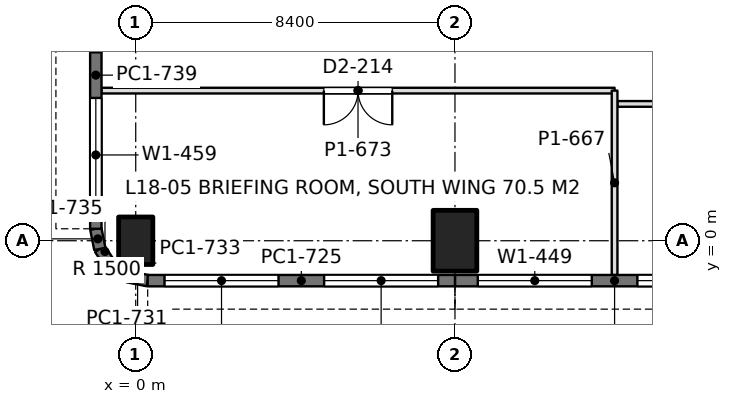
"""IFC4 building model, lengths in metres.
Left out: names, types, materials, properties, quantities, classifications, styles, units other than length and angle.
Written with IfcOpenShell. Run it as: python <this file> out.ifc"""

import sys

from ifc_helpers import new_model, si_unit, direction, frame, frame_2d, origin, origin_with_axes, origin_2d, place, context, subcontext, project, spatial, rectangle, extrude, element, fill, save


model = new_model("IFC4")
c1 = context("Model", 3, precision=1e-05, world=origin(), true_north=direction((0.0, 1.0)))
c2 = subcontext(c1, "Body", "Model", "MODEL_VIEW")
j1 = project(units=[si_unit("LENGTHUNIT", "METRE"), si_unit("PLANEANGLEUNIT", "RADIAN")], contexts=[c1])
p1 = place(None, origin())
s1 = spatial("IfcSite", under=j1, at=p1, CompositionType="ELEMENT")
p2 = place(p1, origin())
s2 = spatial("IfcBuilding", under=s1, at=p2, CompositionType="ELEMENT")
p3 = place(p2, frame((0.0, 0.0, 81.9)))
s3 = spatial("IfcBuildingStorey", under=s2, at=p3, CompositionType="ELEMENT", Elevation=81.9)
p4 = place(p3, origin_with_axes())
e1 = element("IfcColumn", 1, at=p4, inside=s3, PredefinedType="COLUMN", context=c2, shape_type="SweptSolid", body=[
    extrude(rectangle(XDim=0.9, YDim=1.25, at=origin_2d()), origin(), (0.0, 0.0, 1.0), 4.5),
])
p5 = place(p3, frame((8.4, 0.0, 0.0), z_axis=(0.0, 0.0, 1.0), x_axis=(1.0, 0.0, 0.0)))
e2 = element("IfcColumn", 2, at=p5, inside=s3, PredefinedType="COLUMN", context=c2, shape_type="SweptSolid", body=[
    extrude(rectangle(XDim=1.15, YDim=1.6, at=origin_2d()), origin(), (0.0, 0.0, 1.0), 4.5),
])
p6 = place(p3, frame((16.8, -1.05, 0.0), z_axis=(0.0, 0.0, 1.0), x_axis=(-1.0, 0.0, 0.0)))
e3 = element("IfcWall", 3, at=p6, inside=s3, PredefinedType="SOLIDWALL", context=c2, shape_type="SweptSolid", body=[
    extrude(rectangle(XDim=8.4, YDim=0.3, at=frame_2d((4.2, 0.0))), origin(), (0.0, 0.0, 1.0), 4.34),
])
p7 = place(p6, frame((0.6, 0.0, 0.9)))
e4 = element("IfcOpeningElement", 4, at=p7, cuts=e3, PredefinedType="OPENING", context=c2, shape_type="SweptSolid", body=[
    extrude(rectangle(XDim=3.0, YDim=1.9, at=frame_2d((1.5, 0.95))), frame((0.0, 0.16, 0.0), z_axis=(0.0, -1.0, 0.0), x_axis=(1.0, 0.0, 0.0)), (0.0, 0.0, 1.0), 0.32),
])
p8 = place(p6, frame((4.8, 0.0, 0.9)))
e5 = element("IfcOpeningElement", 5, at=p8, cuts=e3, PredefinedType="OPENING", context=c2, shape_type="SweptSolid", body=[
    extrude(rectangle(XDim=3.0, YDim=1.9, at=frame_2d((1.5, 0.95))), frame((0.0, 0.16, 0.0), z_axis=(0.0, -1.0, 0.0), x_axis=(1.0, 0.0, 0.0)), (0.0, 0.0, 1.0), 0.32),
])
p9 = place(p3, frame((8.4, -1.05, 0.0), z_axis=(0.0, 0.0, 1.0), x_axis=(-1.0, 0.0, 0.0)))
e6 = element("IfcWall", 6, at=p9, inside=s3, PredefinedType="SOLIDWALL", context=c2, shape_type="SweptSolid", body=[
    extrude(rectangle(XDim=8.085, YDim=0.3, at=frame_2d((4.042, 0.0))), origin(), (0.0, 0.0, 1.0), 4.34),
])
p10 = place(p9, frame((0.443, 0.0, 0.9)))
e7 = element("IfcOpeningElement", 7, at=p10, cuts=e6, PredefinedType="OPENING", context=c2, shape_type="SweptSolid", body=[
    extrude(rectangle(XDim=3.0, YDim=1.9, at=frame_2d((1.5, 0.95))), frame((0.0, 0.16, 0.0), z_axis=(0.0, -1.0, 0.0), x_axis=(1.0, 0.0, 0.0)), (0.0, 0.0, 1.0), 0.32),
])
p11 = place(p9, frame((4.643, 0.0, 0.9)))
e8 = element("IfcOpeningElement", 8, at=p11, cuts=e6, PredefinedType="OPENING", context=c2, shape_type="SweptSolid", body=[
    extrude(rectangle(XDim=3.0, YDim=1.9, at=frame_2d((1.5, 0.95))), frame((0.0, 0.16, 0.0), z_axis=(0.0, -1.0, 0.0), x_axis=(1.0, 0.0, 0.0)), (0.0, 0.0, 1.0), 0.32),
])
p12 = place(p3, frame((0.315, -1.05, 0.0), z_axis=(0.0, 0.0, 1.0), x_axis=(-0.980788534345, 0.195073962632, 0.0)))
e9 = element("IfcWall", 9, at=p12, inside=s3, PredefinedType="SOLIDWALL", context=c2, shape_type="SweptSolid", body=[
    extrude(rectangle(XDim=0.541, YDim=0.3, at=frame_2d((0.271, 0.0))), origin(), (0.0, 0.0, 1.0), 4.34),
])
for number, where, z_axis, x_axis in (
    (10, (-0.216, -0.945, 0.0), (0.0, 0.0, 1.0), (-0.831, 0.556, 0.0)),
    (11, (-0.653, -0.653, 0.0), (0.0, 0.0, 1.0), (-0.556, 0.831, 0.0)),
):
    element("IfcWall", number, at=place(p3, frame(where, z_axis=z_axis, x_axis=x_axis)), inside=s3, PredefinedType="SOLIDWALL", context=c2, shape_type="SweptSolid", body=[
        extrude(rectangle(XDim=0.526, YDim=0.3, at=frame_2d((0.263, 0.0))), origin(), (0.0, 0.0, 1.0), 4.34),
    ])
p13 = place(p3, frame((-0.945, -0.216, 0.0), z_axis=(0.0, 0.0, 1.0), x_axis=(-0.195073962632, 0.980788534345, 0.0)))
e12 = element("IfcWall", 12, at=p13, inside=s3, PredefinedType="SOLIDWALL", context=c2, shape_type="SweptSolid", body=[
    extrude(rectangle(XDim=0.541, YDim=0.3, at=frame_2d((0.271, 0.0))), origin(), (0.0, 0.0, 1.0), 4.34),
])
p14 = place(p3, frame((-1.05, 0.315, 0.0), z_axis=(0.0, 0.0, 1.0), x_axis=(0.0, 1.0, 0.0)))
e13 = element("IfcWall", 13, at=p14, inside=s3, PredefinedType="SOLIDWALL", context=c2, shape_type="SweptSolid", body=[
    extrude(rectangle(XDim=8.085, YDim=0.3, at=frame_2d((4.042, 0.0))), origin(), (0.0, 0.0, 1.0), 4.34),
])
p15 = place(p14, frame((0.443, 0.0, 0.9)))
e14 = element("IfcOpeningElement", 14, at=p15, cuts=e13, PredefinedType="OPENING", context=c2, shape_type="SweptSolid", body=[
    extrude(rectangle(XDim=3.0, YDim=1.9, at=frame_2d((1.5, 0.95))), frame((0.0, 0.16, 0.0), z_axis=(0.0, -1.0, 0.0), x_axis=(1.0, 0.0, 0.0)), (0.0, 0.0, 1.0), 0.32),
])
p16 = place(p14, frame((4.643, 0.0, 0.9)))
e15 = element("IfcOpeningElement", 15, at=p16, cuts=e13, PredefinedType="OPENING", context=c2, shape_type="SweptSolid", body=[
    extrude(rectangle(XDim=3.0, YDim=1.9, at=frame_2d((1.5, 0.95))), frame((0.0, 0.16, 0.0), z_axis=(0.0, -1.0, 0.0), x_axis=(1.0, 0.0, 0.0)), (0.0, 0.0, 1.0), 0.32),
])
p17 = place(p3, frame((-0.902, 3.95, 0.0), z_axis=(0.0, 0.0, 1.0), x_axis=(1.0, 0.0, 0.0)))
e16 = element("IfcWall", 16, at=p17, inside=s3, PredefinedType="PARTITIONING", context=c2, shape_type="SweptSolid", body=[
    extrude(rectangle(XDim=13.502, YDim=0.15, at=frame_2d((6.751, 0.0))), origin(), (0.0, 0.0, 1.0), 3.74),
])
p18 = place(p17, frame((5.852, 0.0, 0.0)))
e17 = element("IfcOpeningElement", 17, at=p18, cuts=e16, PredefinedType="OPENING", context=c2, shape_type="SweptSolid", body=[
    extrude(rectangle(XDim=1.8, YDim=2.2, at=frame_2d((0.9, 1.1))), frame((0.0, 0.085, 0.0), z_axis=(0.0, -1.0, 0.0), x_axis=(1.0, 0.0, 0.0)), (0.0, 0.0, 1.0), 0.17),
])
p19 = place(p3, frame((12.674, 3.6, 0.0), z_axis=(0.0, 0.0, 1.0), x_axis=(1.0, 0.0, 0.0)))
e18 = element("IfcWall", 18, at=p19, inside=s3, PredefinedType="PARTITIONING", context=c2, shape_type="SweptSolid", body=[
    extrude(rectangle(XDim=12.526, YDim=0.15, at=frame_2d((6.263, 0.0))), origin(), (0.0, 0.0, 1.0), 3.74),
])
p20 = place(p19, frame((1.526, 0.0, 0.0)))
e19 = element("IfcOpeningElement", 19, at=p20, cuts=e18, PredefinedType="OPENING", context=c2, shape_type="SweptSolid", body=[
    extrude(rectangle(XDim=1.0, YDim=2.2, at=frame_2d((0.5, 1.1))), frame((0.0, 0.085, 0.0), z_axis=(0.0, -1.0, 0.0), x_axis=(1.0, 0.0, 0.0)), (0.0, 0.0, 1.0), 0.17),
])
p21 = place(p19, frame((5.726, 0.0, 0.0)))
e20 = element("IfcOpeningElement", 20, at=p21, cuts=e18, PredefinedType="OPENING", context=c2, shape_type="SweptSolid", body=[
    extrude(rectangle(XDim=1.0, YDim=2.2, at=frame_2d((0.5, 1.1))), frame((0.0, 0.085, 0.0), z_axis=(0.0, -1.0, 0.0), x_axis=(1.0, 0.0, 0.0)), (0.0, 0.0, 1.0), 0.17),
])
p22 = place(p19, frame((9.926, 0.0, 0.0)))
e21 = element("IfcOpeningElement", 21, at=p22, cuts=e18, PredefinedType="OPENING", context=c2, shape_type="SweptSolid", body=[
    extrude(rectangle(XDim=1.0, YDim=2.2, at=frame_2d((0.5, 1.1))), frame((0.0, 0.085, 0.0), z_axis=(0.0, -1.0, 0.0), x_axis=(1.0, 0.0, 0.0)), (0.0, 0.0, 1.0), 0.17),
])
p23 = place(p3, frame((12.6, -0.902, 0.0), z_axis=(0.0, 0.0, 1.0), x_axis=(0.0, 1.0, 0.0)))
e22 = element("IfcWall", 22, at=p23, inside=s3, PredefinedType="PARTITIONING", context=c2, shape_type="SweptSolid", body=[
    extrude(rectangle(XDim=4.852, YDim=0.15, at=frame_2d((2.426, 0.0))), origin(), (0.0, 0.0, 1.0), 3.84),
])
p24 = place(p7, origin())
e23 = element("IfcWindow", 23, at=p24, inside=s3, PartitioningType="SINGLE_PANEL", PredefinedType="WINDOW", context=c2, shape_type="SweptSolid", body=[
    extrude(rectangle(XDim=3.0, YDim=1.9, at=frame_2d((1.5, 0.95))), frame((0.0, 0.03, 0.0), z_axis=(0.0, -1.0, 0.0), x_axis=(1.0, 0.0, 0.0)), (0.0, 0.0, 1.0), 0.06),
])
fill(e4, e23)
p25 = place(p8, origin())
e24 = element("IfcWindow", 24, at=p25, inside=s3, PartitioningType="SINGLE_PANEL", PredefinedType="WINDOW", context=c2, shape_type="SweptSolid", body=[
    extrude(rectangle(XDim=3.0, YDim=1.9, at=frame_2d((1.5, 0.95))), frame((0.0, 0.03, 0.0), z_axis=(0.0, -1.0, 0.0), x_axis=(1.0, 0.0, 0.0)), (0.0, 0.0, 1.0), 0.06),
])
fill(e5, e24)
p26 = place(p10, origin())
e25 = element("IfcWindow", 25, at=p26, inside=s3, PartitioningType="SINGLE_PANEL", PredefinedType="WINDOW", context=c2, shape_type="SweptSolid", body=[
    extrude(rectangle(XDim=3.0, YDim=1.9, at=frame_2d((1.5, 0.95))), frame((0.0, 0.03, 0.0), z_axis=(0.0, -1.0, 0.0), x_axis=(1.0, 0.0, 0.0)), (0.0, 0.0, 1.0), 0.06),
])
fill(e7, e25)
p27 = place(p11, origin())
e26 = element("IfcWindow", 26, at=p27, inside=s3, PartitioningType="SINGLE_PANEL", PredefinedType="WINDOW", context=c2, shape_type="SweptSolid", body=[
    extrude(rectangle(XDim=3.0, YDim=1.9, at=frame_2d((1.5, 0.95))), frame((0.0, 0.03, 0.0), z_axis=(0.0, -1.0, 0.0), x_axis=(1.0, 0.0, 0.0)), (0.0, 0.0, 1.0), 0.06),
])
fill(e8, e26)
p28 = place(p15, origin())
e27 = element("IfcWindow", 27, at=p28, inside=s3, PartitioningType="SINGLE_PANEL", PredefinedType="WINDOW", context=c2, shape_type="SweptSolid", body=[
    extrude(rectangle(XDim=3.0, YDim=1.9, at=frame_2d((1.5, 0.95))), frame((0.0, 0.03, 0.0), z_axis=(0.0, -1.0, 0.0), x_axis=(1.0, 0.0, 0.0)), (0.0, 0.0, 1.0), 0.06),
])
fill(e14, e27)
p29 = place(p18, frame((1.8, 0.0, 0.0), z_axis=(0.0, 0.0, 1.0), x_axis=(-1.0, 0.0, 0.0)))
e28 = element("IfcDoor", 28, at=p29, inside=s3, OperationType="DOUBLE_DOOR_SINGLE_SWING", PredefinedType="DOOR", context=c2, shape_type="SweptSolid", body=[
    extrude(rectangle(XDim=1.8, YDim=2.2, at=frame_2d((0.9, 1.1))), frame((0.0, 0.025, 0.0), z_axis=(0.0, -1.0, 0.0), x_axis=(1.0, 0.0, 0.0)), (0.0, 0.0, 1.0), 0.05),
])
fill(e17, e28)
save(model, sys.argv[1])
